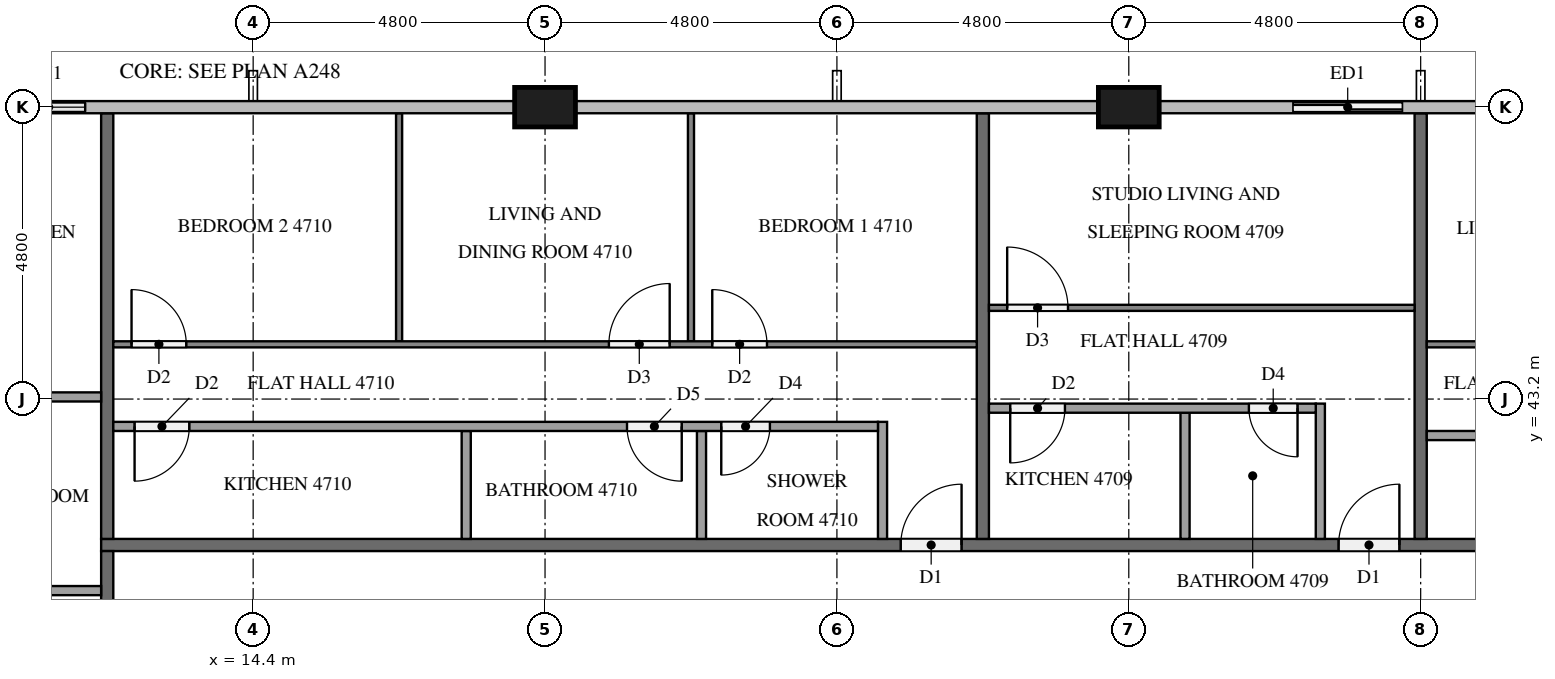
"""IFC4 building model, lengths in metres.
Left out: names, types, materials, properties, quantities, classifications, styles, units other than length and angle.
Written with IfcOpenShell. Run it as: python <this file> out.ifc"""

import sys

from ifc_helpers import new_model, si_unit, direction, frame, frame_2d, origin, origin_2d, place, context, subcontext, project, spatial, rectangle, extrude, element, fill, save


model = new_model("IFC4")
c1 = context("Model", 3, precision=1e-05, world=origin(), true_north=direction((0.0, 1.0)))
c2 = subcontext(c1, "Body", "Model", "MODEL_VIEW")
j1 = project(units=[si_unit("LENGTHUNIT", "METRE"), si_unit("PLANEANGLEUNIT", "RADIAN")], contexts=[c1])
p1 = place(None, origin())
s1 = spatial("IfcSite", under=j1, at=p1, CompositionType="ELEMENT")
p2 = place(p1, origin())
s2 = spatial("IfcBuilding", under=s1, at=p2, CompositionType="ELEMENT")
p3 = place(p2, frame((0.0, 0.0, 182.4)))
s3 = spatial("IfcBuildingStorey", under=s2, at=p3, CompositionType="ELEMENT", Elevation=182.4)
for number, where, z_axis, x_axis in (
    (1, (28.8, 48.0, 0.0), (0.0, 0.0, 1.0), (1.0, 0.0, 0.0)),
    (2, (19.2, 48.0, 0.0), (0.0, 0.0, 1.0), (1.0, 0.0, 0.0)),
):
    element("IfcColumn", number, at=place(p3, frame(where, z_axis=z_axis, x_axis=x_axis)), inside=s3, PredefinedType="COLUMN", context=c2, shape_type="SweptSolid", body=[
        extrude(rectangle(XDim=1.0, YDim=0.65, at=origin_2d()), origin(), (0.0, 0.0, 1.0), 3.2),
    ])
p4 = place(p3, frame((33.6, 48.0, 0.0), z_axis=(0.0, 0.0, 1.0), x_axis=(-1.0, 0.0, 0.0)))
e3 = element("IfcWall", 3, at=p4, inside=s3, PredefinedType="SOLIDWALL", context=c2, shape_type="SweptSolid", body=[
    extrude(rectangle(XDim=2.4, YDim=0.15, at=frame_2d((1.2, 0.0))), origin(), (0.0, 0.0, 1.0), 3.2),
])
p5 = place(p4, frame((0.3, 0.0, 0.0)))
e4 = element("IfcOpeningElement", 4, at=p5, cuts=e3, PredefinedType="OPENING", context=c2, shape_type="SweptSolid", body=[
    extrude(rectangle(XDim=1.8, YDim=2.4, at=frame_2d((0.9, 1.2))), frame((0.0, 0.085, 0.0), z_axis=(0.0, -1.0, 0.0), x_axis=(1.0, 0.0, 0.0)), (0.0, 0.0, 1.0), 0.17),
])
p6 = place(p3, frame((12.0, 48.0, 0.0), z_axis=(0.0, 0.0, 1.0), x_axis=(-1.0, 0.0, 0.0)))
e5 = element("IfcWall", 5, at=p6, inside=s3, PredefinedType="SOLIDWALL", context=c2, shape_type="SweptSolid", body=[
    extrude(rectangle(XDim=1.925, YDim=0.15, at=frame_2d((0.962, 0.0))), origin(), (0.0, 0.0, 1.0), 3.2),
])
p7 = place(p6, frame((0.363, 0.0, 0.9)))
e6 = element("IfcOpeningElement", 6, at=p7, cuts=e5, PredefinedType="OPENING", context=c2, shape_type="SweptSolid", body=[
    extrude(rectangle(XDim=1.2, YDim=1.4, at=frame_2d((0.6, 0.7))), frame((0.0, 0.085, 0.0), z_axis=(0.0, -1.0, 0.0), x_axis=(1.0, 0.0, 0.0)), (0.0, 0.0, 1.0), 0.17),
])
p8 = place(p3, frame((11.9, 40.8, 0.0), z_axis=(0.0, 0.0, 1.0), x_axis=(1.0, 0.0, 0.0)))
e7 = element("IfcWall", 7, at=p8, inside=s3, PredefinedType="PARTITIONING", context=c2, shape_type="SweptSolid", body=[
    extrude(rectangle(XDim=38.6, YDim=0.2, at=frame_2d((19.3, 0.0))), origin(), (0.0, 0.0, 1.0), 3.2),
])
p9 = place(p8, frame((37.15, 0.0, 0.0)))
e8 = element("IfcOpeningElement", 8, at=p9, cuts=e7, PredefinedType="OPENING", context=c2, shape_type="SweptSolid", body=[
    extrude(rectangle(XDim=1.0, YDim=2.1, at=frame_2d((0.5, 1.05))), frame((0.0, 0.11, 0.0), z_axis=(0.0, -1.0, 0.0), x_axis=(1.0, 0.0, 0.0)), (0.0, 0.0, 1.0), 0.22),
])
p10 = place(p8, frame((20.35, 0.0, 0.0)))
e9 = element("IfcOpeningElement", 9, at=p10, cuts=e7, PredefinedType="OPENING", context=c2, shape_type="SweptSolid", body=[
    extrude(rectangle(XDim=1.0, YDim=2.1, at=frame_2d((0.5, 1.05))), frame((0.0, 0.11, 0.0), z_axis=(0.0, -1.0, 0.0), x_axis=(1.0, 0.0, 0.0)), (0.0, 0.0, 1.0), 0.22),
])
p11 = place(p8, frame((13.15, 0.0, 0.0)))
e10 = element("IfcOpeningElement", 10, at=p11, cuts=e7, PredefinedType="OPENING", context=c2, shape_type="SweptSolid", body=[
    extrude(rectangle(XDim=1.0, YDim=2.1, at=frame_2d((0.5, 1.05))), frame((0.0, 0.11, 0.0), z_axis=(0.0, -1.0, 0.0), x_axis=(1.0, 0.0, 0.0)), (0.0, 0.0, 1.0), 0.22),
])
p12 = place(p3, frame((12.0, 12.1, 0.0), z_axis=(0.0, 0.0, 1.0), x_axis=(0.0, 1.0, 0.0)))
e11 = element("IfcWall", 11, at=p12, inside=s3, PredefinedType="PARTITIONING", context=c2, shape_type="SweptSolid", body=[
    extrude(rectangle(XDim=28.6, YDim=0.2, at=frame_2d((14.3, 0.0))), origin(), (0.0, 0.0, 1.0), 3.2),
])
p13 = place(p12, frame((26.65, 0.0, 0.0)))
e12 = element("IfcOpeningElement", 12, at=p13, cuts=e11, PredefinedType="OPENING", context=c2, shape_type="SweptSolid", body=[
    extrude(rectangle(XDim=1.0, YDim=2.1, at=frame_2d((0.5, 1.05))), frame((0.0, 0.11, 0.0), z_axis=(0.0, -1.0, 0.0), x_axis=(1.0, 0.0, 0.0)), (0.0, 0.0, 1.0), 0.22),
])
p14 = place(p12, frame((24.95, 0.0, 0.0)))
e13 = element("IfcOpeningElement", 13, at=p14, cuts=e11, PredefinedType="OPENING", context=c2, shape_type="SweptSolid", body=[
    extrude(rectangle(XDim=1.0, YDim=2.1, at=frame_2d((0.5, 1.05))), frame((0.0, 0.11, 0.0), z_axis=(0.0, -1.0, 0.0), x_axis=(1.0, 0.0, 0.0)), (0.0, 0.0, 1.0), 0.22),
])
p15 = place(p12, frame((12.95, 0.0, 0.0)))
e14 = element("IfcOpeningElement", 14, at=p15, cuts=e11, PredefinedType="OPENING", context=c2, shape_type="SweptSolid", body=[
    extrude(rectangle(XDim=1.0, YDim=2.1, at=frame_2d((0.5, 1.05))), frame((0.0, 0.11, 0.0), z_axis=(0.0, -1.0, 0.0), x_axis=(1.0, 0.0, 0.0)), (0.0, 0.0, 1.0), 0.22),
])
for number, where, z_axis, x_axis in (
    (15, (33.6, 47.9, 0.0), (0.0, 0.0, 1.0), (0.0, -1.0, 0.0)),
    (16, (26.4, 47.9, 0.0), (0.0, 0.0, 1.0), (0.0, -1.0, 0.0)),
    (17, (12.0, 47.9, 0.0), (0.0, 0.0, 1.0), (0.0, -1.0, 0.0)),
):
    element("IfcWall", number, at=place(p3, frame(where, z_axis=z_axis, x_axis=x_axis)), inside=s3, PredefinedType="PARTITIONING", context=c2, shape_type="SweptSolid", body=[
        extrude(rectangle(XDim=7.0, YDim=0.2, at=frame_2d((3.5, 0.0))), origin(), (0.0, 0.0, 1.0), 3.2),
    ])
p16 = place(p3, frame((33.7, 44.1, 0.0), z_axis=(0.0, 0.0, 1.0), x_axis=(1.0, 0.0, 0.0)))
e18 = element("IfcWall", 18, at=p16, inside=s3, PredefinedType="PARTITIONING", context=c2, shape_type="SweptSolid", body=[
    extrude(rectangle(XDim=16.6, YDim=0.1, at=frame_2d((8.3, 0.0))), origin(), (0.0, 0.0, 1.0), 3.2),
])
p17 = place(p16, frame((15.4, 0.0, 0.0)))
e19 = element("IfcOpeningElement", 19, at=p17, cuts=e18, PredefinedType="OPENING", context=c2, shape_type="SweptSolid", body=[
    extrude(rectangle(XDim=0.9, YDim=2.1, at=frame_2d((0.45, 1.05))), frame((0.0, 0.06, 0.0), z_axis=(0.0, -1.0, 0.0), x_axis=(1.0, 0.0, 0.0)), (0.0, 0.0, 1.0), 0.12),
])
p18 = place(p16, frame((7.45, 0.0, 0.0)))
e20 = element("IfcOpeningElement", 20, at=p18, cuts=e18, PredefinedType="OPENING", context=c2, shape_type="SweptSolid", body=[
    extrude(rectangle(XDim=0.9, YDim=2.1, at=frame_2d((0.45, 1.05))), frame((0.0, 0.06, 0.0), z_axis=(0.0, -1.0, 0.0), x_axis=(1.0, 0.0, 0.0)), (0.0, 0.0, 1.0), 0.12),
])
p19 = place(p16, frame((5.75, 0.0, 0.0)))
e21 = element("IfcOpeningElement", 21, at=p19, cuts=e18, PredefinedType="OPENING", context=c2, shape_type="SweptSolid", body=[
    extrude(rectangle(XDim=1.0, YDim=2.1, at=frame_2d((0.5, 1.05))), frame((0.0, 0.06, 0.0), z_axis=(0.0, -1.0, 0.0), x_axis=(1.0, 0.0, 0.0)), (0.0, 0.0, 1.0), 0.12),
])
p20 = place(p3, frame((48.675, 42.6, 0.0), z_axis=(0.0, 0.0, 1.0), x_axis=(-1.0, 0.0, 0.0)))
e22 = element("IfcWall", 22, at=p20, inside=s3, PredefinedType="PARTITIONING", context=c2, shape_type="SweptSolid", body=[
    extrude(rectangle(XDim=14.975, YDim=0.15, at=frame_2d((7.488, 0.0))), origin(), (0.0, 0.0, 1.0), 3.2),
])
p21 = place(p20, frame((0.3, 0.0, 0.0)))
e23 = element("IfcOpeningElement", 23, at=p21, cuts=e22, PredefinedType="OPENING", context=c2, shape_type="SweptSolid", body=[
    extrude(rectangle(XDim=0.8, YDim=2.1, at=frame_2d((0.4, 1.05))), frame((0.0, 0.085, 0.0), z_axis=(0.0, -1.0, 0.0), x_axis=(1.0, 0.0, 0.0)), (0.0, 0.0, 1.0), 0.17),
])
p22 = place(p20, frame((6.838, 0.0, 0.0)))
e24 = element("IfcOpeningElement", 24, at=p22, cuts=e22, PredefinedType="OPENING", context=c2, shape_type="SweptSolid", body=[
    extrude(rectangle(XDim=0.9, YDim=2.1, at=frame_2d((0.45, 1.05))), frame((0.0, 0.085, 0.0), z_axis=(0.0, -1.0, 0.0), x_axis=(1.0, 0.0, 0.0)), (0.0, 0.0, 1.0), 0.17),
])
p23 = place(p20, frame((8.388, 0.0, 0.0)))
e25 = element("IfcOpeningElement", 25, at=p23, cuts=e22, PredefinedType="OPENING", context=c2, shape_type="SweptSolid", body=[
    extrude(rectangle(XDim=0.9, YDim=2.1, at=frame_2d((0.45, 1.05))), frame((0.0, 0.085, 0.0), z_axis=(0.0, -1.0, 0.0), x_axis=(1.0, 0.0, 0.0)), (0.0, 0.0, 1.0), 0.17),
])
p24 = place(p3, frame((26.5, 44.7, 0.0), z_axis=(0.0, 0.0, 1.0), x_axis=(1.0, 0.0, 0.0)))
e26 = element("IfcWall", 26, at=p24, inside=s3, PredefinedType="PARTITIONING", context=c2, shape_type="SweptSolid", body=[
    extrude(rectangle(XDim=7.0, YDim=0.1, at=frame_2d((3.5, 0.0))), origin(), (0.0, 0.0, 1.0), 3.2),
])
p25 = place(p24, frame((0.3, 0.0, 0.0)))
e27 = element("IfcOpeningElement", 27, at=p25, cuts=e26, PredefinedType="OPENING", context=c2, shape_type="SweptSolid", body=[
    extrude(rectangle(XDim=1.0, YDim=2.1, at=frame_2d((0.5, 1.05))), frame((0.0, 0.06, 0.0), z_axis=(0.0, -1.0, 0.0), x_axis=(1.0, 0.0, 0.0)), (0.0, 0.0, 1.0), 0.12),
])
p26 = place(p3, frame((29.725, 40.9, 0.0), z_axis=(0.0, 0.0, 1.0), x_axis=(0.0, 1.0, 0.0)))
e28 = element("IfcWall", 28, at=p26, inside=s3, PredefinedType="PARTITIONING", context=c2, shape_type="SweptSolid", body=[
    extrude(rectangle(XDim=2.075, YDim=0.15, at=frame_2d((1.038, 0.0))), origin(), (0.0, 0.0, 1.0), 3.2),
])
p27 = place(p3, frame((31.95, 40.9, 0.0), z_axis=(0.0, 0.0, 1.0), x_axis=(0.0, 1.0, 0.0)))
e29 = element("IfcWall", 29, at=p27, inside=s3, PredefinedType="PARTITIONING", context=c2, shape_type="SweptSolid", body=[
    extrude(rectangle(XDim=2.225, YDim=0.15, at=frame_2d((1.113, 0.0))), origin(), (0.0, 0.0, 1.0), 3.2),
])
p28 = place(p3, frame((31.875, 43.05, 0.0), z_axis=(0.0, 0.0, 1.0), x_axis=(-1.0, 0.0, 0.0)))
e30 = element("IfcWall", 30, at=p28, inside=s3, PredefinedType="PARTITIONING", context=c2, shape_type="SweptSolid", body=[
    extrude(rectangle(XDim=5.375, YDim=0.15, at=frame_2d((2.688, 0.0))), origin(), (0.0, 0.0, 1.0), 3.2),
])
p29 = place(p28, frame((0.3, 0.0, 0.0)))
e31 = element("IfcOpeningElement", 31, at=p29, cuts=e30, PredefinedType="OPENING", context=c2, shape_type="SweptSolid", body=[
    extrude(rectangle(XDim=0.8, YDim=2.1, at=frame_2d((0.4, 1.05))), frame((0.0, 0.085, 0.0), z_axis=(0.0, -1.0, 0.0), x_axis=(1.0, 0.0, 0.0)), (0.0, 0.0, 1.0), 0.17),
])
p30 = place(p28, frame((4.125, 0.0, 0.0)))
e32 = element("IfcOpeningElement", 32, at=p30, cuts=e30, PredefinedType="OPENING", context=c2, shape_type="SweptSolid", body=[
    extrude(rectangle(XDim=0.9, YDim=2.1, at=frame_2d((0.45, 1.05))), frame((0.0, 0.085, 0.0), z_axis=(0.0, -1.0, 0.0), x_axis=(1.0, 0.0, 0.0)), (0.0, 0.0, 1.0), 0.17),
])
for number, where, z_axis, x_axis in (
    (33, (21.6, 44.15, 0.0), (0.0, 0.0, 1.0), (0.0, 1.0, 0.0)),
    (34, (16.8, 44.15, 0.0), (0.0, 0.0, 1.0), (0.0, 1.0, 0.0)),
):
    element("IfcWall", number, at=place(p3, frame(where, z_axis=z_axis, x_axis=x_axis)), inside=s3, PredefinedType="PARTITIONING", context=c2, shape_type="SweptSolid", body=[
        extrude(rectangle(XDim=3.75, YDim=0.1, at=frame_2d((1.875, 0.0))), origin(), (0.0, 0.0, 1.0), 3.2),
    ])
p31 = place(p3, frame((12.1, 44.1, 0.0), z_axis=(0.0, 0.0, 1.0), x_axis=(1.0, 0.0, 0.0)))
e35 = element("IfcWall", 35, at=p31, inside=s3, PredefinedType="PARTITIONING", context=c2, shape_type="SweptSolid", body=[
    extrude(rectangle(XDim=14.2, YDim=0.1, at=frame_2d((7.1, 0.0))), origin(), (0.0, 0.0, 1.0), 3.2),
])
p32 = place(p31, frame((9.85, 0.0, 0.0)))
e36 = element("IfcOpeningElement", 36, at=p32, cuts=e35, PredefinedType="OPENING", context=c2, shape_type="SweptSolid", body=[
    extrude(rectangle(XDim=0.9, YDim=2.1, at=frame_2d((0.45, 1.05))), frame((0.0, 0.06, 0.0), z_axis=(0.0, -1.0, 0.0), x_axis=(1.0, 0.0, 0.0)), (0.0, 0.0, 1.0), 0.12),
])
p33 = place(p31, frame((8.15, 0.0, 0.0)))
e37 = element("IfcOpeningElement", 37, at=p33, cuts=e35, PredefinedType="OPENING", context=c2, shape_type="SweptSolid", body=[
    extrude(rectangle(XDim=1.0, YDim=2.1, at=frame_2d((0.5, 1.05))), frame((0.0, 0.06, 0.0), z_axis=(0.0, -1.0, 0.0), x_axis=(1.0, 0.0, 0.0)), (0.0, 0.0, 1.0), 0.12),
])
p34 = place(p31, frame((0.3, 0.0, 0.0)))
e38 = element("IfcOpeningElement", 38, at=p34, cuts=e35, PredefinedType="OPENING", context=c2, shape_type="SweptSolid", body=[
    extrude(rectangle(XDim=0.9, YDim=2.1, at=frame_2d((0.45, 1.05))), frame((0.0, 0.06, 0.0), z_axis=(0.0, -1.0, 0.0), x_axis=(1.0, 0.0, 0.0)), (0.0, 0.0, 1.0), 0.12),
])
for number, where, z_axis, x_axis in (
    (39, (21.773, 40.9, 0.0), (0.0, 0.0, 1.0), (0.0, 1.0, 0.0)),
    (40, (17.904, 40.9, 0.0), (0.0, 0.0, 1.0), (0.0, 1.0, 0.0)),
):
    element("IfcWall", number, at=place(p3, frame(where, z_axis=z_axis, x_axis=x_axis)), inside=s3, PredefinedType="PARTITIONING", context=c2, shape_type="SweptSolid", body=[
        extrude(rectangle(XDim=1.775, YDim=0.15, at=frame_2d((0.888, 0.0))), origin(), (0.0, 0.0, 1.0), 3.2),
    ])
p35 = place(p3, frame((24.75, 40.9, 0.0), z_axis=(0.0, 0.0, 1.0), x_axis=(0.0, 1.0, 0.0)))
e41 = element("IfcWall", 41, at=p35, inside=s3, PredefinedType="PARTITIONING", context=c2, shape_type="SweptSolid", body=[
    extrude(rectangle(XDim=1.925, YDim=0.15, at=frame_2d((0.962, 0.0))), origin(), (0.0, 0.0, 1.0), 3.2),
])
p36 = place(p3, frame((24.675, 42.75, 0.0), z_axis=(0.0, 0.0, 1.0), x_axis=(-1.0, 0.0, 0.0)))
e42 = element("IfcWall", 42, at=p36, inside=s3, PredefinedType="PARTITIONING", context=c2, shape_type="SweptSolid", body=[
    extrude(rectangle(XDim=12.575, YDim=0.15, at=frame_2d((6.288, 0.0))), origin(), (0.0, 0.0, 1.0), 3.2),
])
p37 = place(p36, frame((1.777, 0.0, 0.0)))
e43 = element("IfcOpeningElement", 43, at=p37, cuts=e42, PredefinedType="OPENING", context=c2, shape_type="SweptSolid", body=[
    extrude(rectangle(XDim=0.8, YDim=2.1, at=frame_2d((0.4, 1.05))), frame((0.0, 0.085, 0.0), z_axis=(0.0, -1.0, 0.0), x_axis=(1.0, 0.0, 0.0)), (0.0, 0.0, 1.0), 0.17),
])
p38 = place(p36, frame((3.227, 0.0, 0.0)))
e44 = element("IfcOpeningElement", 44, at=p38, cuts=e42, PredefinedType="OPENING", context=c2, shape_type="SweptSolid", body=[
    extrude(rectangle(XDim=0.9, YDim=2.1, at=frame_2d((0.45, 1.05))), frame((0.0, 0.085, 0.0), z_axis=(0.0, -1.0, 0.0), x_axis=(1.0, 0.0, 0.0)), (0.0, 0.0, 1.0), 0.17),
])
p39 = place(p36, frame((11.325, 0.0, 0.0)))
e45 = element("IfcOpeningElement", 45, at=p39, cuts=e42, PredefinedType="OPENING", context=c2, shape_type="SweptSolid", body=[
    extrude(rectangle(XDim=0.9, YDim=2.1, at=frame_2d((0.45, 1.05))), frame((0.0, 0.085, 0.0), z_axis=(0.0, -1.0, 0.0), x_axis=(1.0, 0.0, 0.0)), (0.0, 0.0, 1.0), 0.17),
])
p40 = place(p3, frame((11.9, 43.235, 0.0), z_axis=(0.0, 0.0, 1.0), x_axis=(-1.0, 0.0, 0.0)))
e46 = element("IfcWall", 46, at=p40, inside=s3, PredefinedType="PARTITIONING", context=c2, shape_type="SweptSolid", body=[
    extrude(rectangle(XDim=2.225, YDim=0.15, at=frame_2d((1.112, 0.0))), origin(), (0.0, 0.0, 1.0), 3.2),
])
p41 = place(p3, frame((11.9, 40.05, 0.0), z_axis=(0.0, 0.0, 1.0), x_axis=(-1.0, 0.0, 0.0)))
e47 = element("IfcWall", 47, at=p41, inside=s3, PredefinedType="PARTITIONING", context=c2, shape_type="SweptSolid", body=[
    extrude(rectangle(XDim=2.375, YDim=0.15, at=frame_2d((1.188, 0.0))), origin(), (0.0, 0.0, 1.0), 3.2),
])
p42 = place(p5, origin())
e48 = element("IfcDoor", 48, at=p42, inside=s3, OperationType="SLIDING_TO_LEFT", PredefinedType="DOOR", context=c2, shape_type="SweptSolid", body=[
    extrude(rectangle(XDim=1.8, YDim=2.4, at=frame_2d((0.9, 1.2))), frame((0.0, 0.025, 0.0), z_axis=(0.0, -1.0, 0.0), x_axis=(1.0, 0.0, 0.0)), (0.0, 0.0, 1.0), 0.05),
])
fill(e4, e48)
p43 = place(p7, origin())
e49 = element("IfcWindow", 49, at=p43, inside=s3, PartitioningType="SINGLE_PANEL", PredefinedType="WINDOW", context=c2, shape_type="SweptSolid", body=[
    extrude(rectangle(XDim=1.2, YDim=1.4, at=frame_2d((0.6, 0.7))), frame((0.0, 0.03, 0.0), z_axis=(0.0, -1.0, 0.0), x_axis=(1.0, 0.0, 0.0)), (0.0, 0.0, 1.0), 0.06),
])
fill(e6, e49)
p44 = place(p10, origin())
e50 = element("IfcDoor", 50, at=p44, inside=s3, OperationType="SINGLE_SWING_RIGHT", PredefinedType="DOOR", context=c2, shape_type="SweptSolid", body=[
    extrude(rectangle(XDim=1.0, YDim=2.1, at=frame_2d((0.5, 1.05))), frame((0.0, 0.025, 0.0), z_axis=(0.0, -1.0, 0.0), x_axis=(1.0, 0.0, 0.0)), (0.0, 0.0, 1.0), 0.05),
])
fill(e9, e50)
p45 = place(p11, origin())
e51 = element("IfcDoor", 51, at=p45, inside=s3, OperationType="SINGLE_SWING_RIGHT", PredefinedType="DOOR", context=c2, shape_type="SweptSolid", body=[
    extrude(rectangle(XDim=1.0, YDim=2.1, at=frame_2d((0.5, 1.05))), frame((0.0, 0.025, 0.0), z_axis=(0.0, -1.0, 0.0), x_axis=(1.0, 0.0, 0.0)), (0.0, 0.0, 1.0), 0.05),
])
fill(e10, e51)
p46 = place(p25, origin())
e52 = element("IfcDoor", 52, at=p46, inside=s3, OperationType="SINGLE_SWING_LEFT", PredefinedType="DOOR", context=c2, shape_type="SweptSolid", body=[
    extrude(rectangle(XDim=1.0, YDim=2.1, at=frame_2d((0.5, 1.05))), frame((0.0, 0.025, 0.0), z_axis=(0.0, -1.0, 0.0), x_axis=(1.0, 0.0, 0.0)), (0.0, 0.0, 1.0), 0.05),
])
fill(e27, e52)
p47 = place(p29, origin())
e53 = element("IfcDoor", 53, at=p47, inside=s3, OperationType="SINGLE_SWING_LEFT", PredefinedType="DOOR", context=c2, shape_type="SweptSolid", body=[
    extrude(rectangle(XDim=0.8, YDim=2.1, at=frame_2d((0.4, 1.05))), frame((0.0, 0.025, 0.0), z_axis=(0.0, -1.0, 0.0), x_axis=(1.0, 0.0, 0.0)), (0.0, 0.0, 1.0), 0.05),
])
fill(e31, e53)
p48 = place(p30, origin())
e54 = element("IfcDoor", 54, at=p48, inside=s3, OperationType="SINGLE_SWING_RIGHT", PredefinedType="DOOR", context=c2, shape_type="SweptSolid", body=[
    extrude(rectangle(XDim=0.9, YDim=2.1, at=frame_2d((0.45, 1.05))), frame((0.0, 0.025, 0.0), z_axis=(0.0, -1.0, 0.0), x_axis=(1.0, 0.0, 0.0)), (0.0, 0.0, 1.0), 0.05),
])
fill(e32, e54)
p49 = place(p32, origin())
e55 = element("IfcDoor", 55, at=p49, inside=s3, OperationType="SINGLE_SWING_LEFT", PredefinedType="DOOR", context=c2, shape_type="SweptSolid", body=[
    extrude(rectangle(XDim=0.9, YDim=2.1, at=frame_2d((0.45, 1.05))), frame((0.0, 0.025, 0.0), z_axis=(0.0, -1.0, 0.0), x_axis=(1.0, 0.0, 0.0)), (0.0, 0.0, 1.0), 0.05),
])
fill(e36, e55)
p50 = place(p33, origin())
e56 = element("IfcDoor", 56, at=p50, inside=s3, OperationType="SINGLE_SWING_RIGHT", PredefinedType="DOOR", context=c2, shape_type="SweptSolid", body=[
    extrude(rectangle(XDim=1.0, YDim=2.1, at=frame_2d((0.5, 1.05))), frame((0.0, 0.025, 0.0), z_axis=(0.0, -1.0, 0.0), x_axis=(1.0, 0.0, 0.0)), (0.0, 0.0, 1.0), 0.05),
])
fill(e37, e56)
p51 = place(p34, origin())
e57 = element("IfcDoor", 57, at=p51, inside=s3, OperationType="SINGLE_SWING_LEFT", PredefinedType="DOOR", context=c2, shape_type="SweptSolid", body=[
    extrude(rectangle(XDim=0.9, YDim=2.1, at=frame_2d((0.45, 1.05))), frame((0.0, 0.025, 0.0), z_axis=(0.0, -1.0, 0.0), x_axis=(1.0, 0.0, 0.0)), (0.0, 0.0, 1.0), 0.05),
])
fill(e38, e57)
p52 = place(p37, origin())
e58 = element("IfcDoor", 58, at=p52, inside=s3, OperationType="SINGLE_SWING_RIGHT", PredefinedType="DOOR", context=c2, shape_type="SweptSolid", body=[
    extrude(rectangle(XDim=0.8, YDim=2.1, at=frame_2d((0.4, 1.05))), frame((0.0, 0.025, 0.0), z_axis=(0.0, -1.0, 0.0), x_axis=(1.0, 0.0, 0.0)), (0.0, 0.0, 1.0), 0.05),
])
fill(e43, e58)
p53 = place(p38, origin())
e59 = element("IfcDoor", 59, at=p53, inside=s3, OperationType="SINGLE_SWING_LEFT", PredefinedType="DOOR", context=c2, shape_type="SweptSolid", body=[
    extrude(rectangle(XDim=0.9, YDim=2.1, at=frame_2d((0.45, 1.05))), frame((0.0, 0.025, 0.0), z_axis=(0.0, -1.0, 0.0), x_axis=(1.0, 0.0, 0.0)), (0.0, 0.0, 1.0), 0.05),
])
fill(e44, e59)
p54 = place(p39, origin())
e60 = element("IfcDoor", 60, at=p54, inside=s3, OperationType="SINGLE_SWING_RIGHT", PredefinedType="DOOR", context=c2, shape_type="SweptSolid", body=[
    extrude(rectangle(XDim=0.9, YDim=2.1, at=frame_2d((0.45, 1.05))), frame((0.0, 0.025, 0.0), z_axis=(0.0, -1.0, 0.0), x_axis=(1.0, 0.0, 0.0)), (0.0, 0.0, 1.0), 0.05),
])
fill(e45, e60)
save(model, sys.argv[1])
